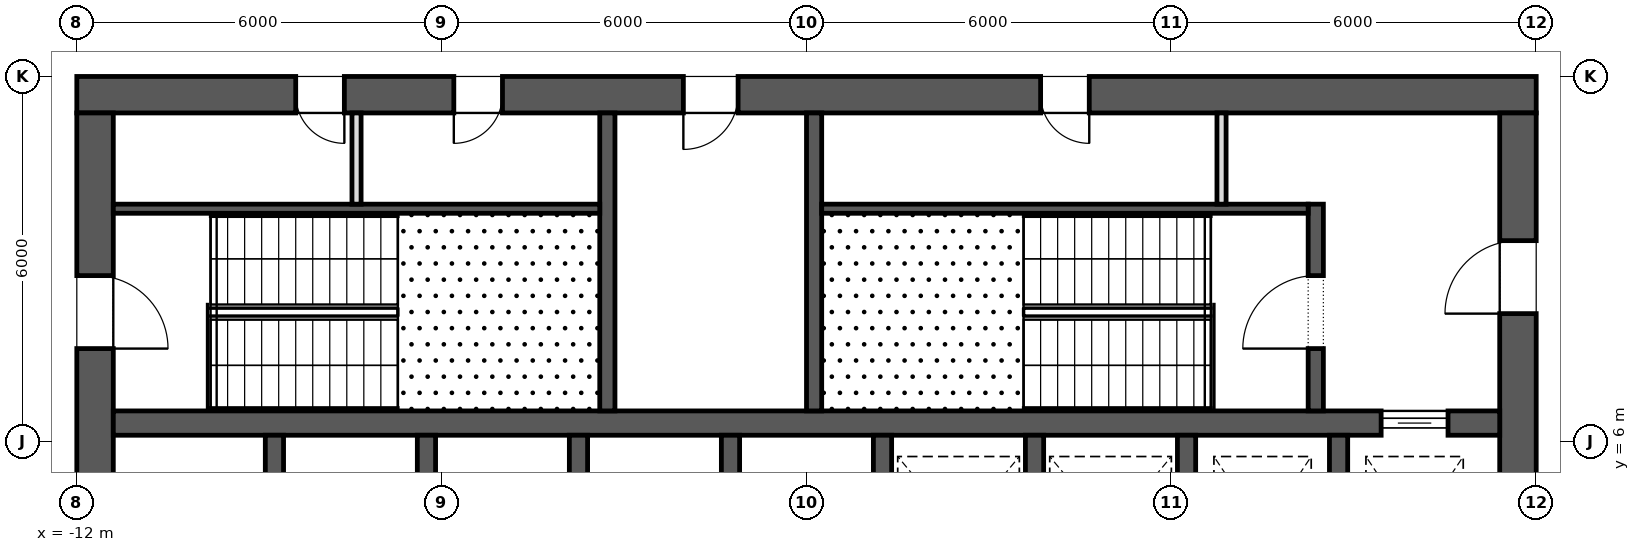
"""IFC4 building model, lengths in metres.
Left out: names, types, materials, properties, quantities, classifications, styles, units other than length and angle.
Written with IfcOpenShell. Run it as: python <this file> out.ifc"""

import sys

from ifc_helpers import new_model, si_unit, direction, frame, frame_2d, origin, place, context, subcontext, project, spatial, rectangle, extrude, element, fill, save


model = new_model("IFC4")
c1 = context("Model", 3, precision=1e-05, world=origin(), true_north=direction((0.0, 1.0)))
c2 = subcontext(c1, "Body", "Model", "MODEL_VIEW")
j1 = project(units=[si_unit("LENGTHUNIT", "METRE"), si_unit("PLANEANGLEUNIT", "RADIAN")], contexts=[c1])
p1 = place(None, origin())
s1 = spatial("IfcSite", under=j1, at=p1, CompositionType="ELEMENT")
p2 = place(p1, origin())
s2 = spatial("IfcBuilding", under=s1, at=p2, CompositionType="ELEMENT")
p3 = place(p2, frame((0.0, 0.0, 31.9)))
s3 = spatial("IfcBuildingStorey", under=s2, at=p3, CompositionType="ELEMENT", Elevation=31.9)
p4 = place(p3, frame((-12.0, 11.7, 0.0), z_axis=(0.0, 0.0, 1.0), x_axis=(1.0, 0.0, 0.0)))
e1 = element("IfcWall", 1, at=p4, inside=s3, PredefinedType="SHEAR", context=c2, shape_type="SweptSolid", body=[
    extrude(rectangle(XDim=24.0, YDim=0.6, at=frame_2d((12.0, 0.0))), origin(), (0.0, 0.0, 1.0), 4.2),
])
p5 = place(p4, frame((9.975, 0.0, 0.0)))
e2 = element("IfcOpeningElement", 2, at=p5, cuts=e1, PredefinedType="OPENING", context=c2, shape_type="SweptSolid", body=[
    extrude(rectangle(XDim=0.9, YDim=2.1, at=frame_2d((0.45, 1.05))), frame((0.0, 0.312, 0.0), z_axis=(0.0, -1.0, 0.0), x_axis=(1.0, 0.0, 0.0)), (0.0, 0.0, 1.0), 0.624),
])
p6 = place(p4, frame((3.6, 0.0, 0.0)))
e3 = element("IfcOpeningElement", 3, at=p6, cuts=e1, PredefinedType="OPENING", context=c2, shape_type="SweptSolid", body=[
    extrude(rectangle(XDim=0.8, YDim=2.1, at=frame_2d((0.4, 1.05))), frame((0.0, 0.312, 0.0), z_axis=(0.0, -1.0, 0.0), x_axis=(1.0, 0.0, 0.0)), (0.0, 0.0, 1.0), 0.624),
])
p7 = place(p4, frame((6.2, 0.0, 0.0)))
e4 = element("IfcOpeningElement", 4, at=p7, cuts=e1, PredefinedType="OPENING", context=c2, shape_type="SweptSolid", body=[
    extrude(rectangle(XDim=0.8, YDim=2.1, at=frame_2d((0.4, 1.05))), frame((0.0, 0.312, 0.0), z_axis=(0.0, -1.0, 0.0), x_axis=(1.0, 0.0, 0.0)), (0.0, 0.0, 1.0), 0.624),
])
p8 = place(p4, frame((15.85, 0.0, 0.0)))
e5 = element("IfcOpeningElement", 5, at=p8, cuts=e1, PredefinedType="OPENING", context=c2, shape_type="SweptSolid", body=[
    extrude(rectangle(XDim=0.8, YDim=2.1, at=frame_2d((0.4, 1.05))), frame((0.0, 0.312, 0.0), z_axis=(0.0, -1.0, 0.0), x_axis=(1.0, 0.0, 0.0)), (0.0, 0.0, 1.0), 0.624),
])
p9 = place(p3, frame((11.7, -11.4, 0.0), z_axis=(0.0, 0.0, 1.0), x_axis=(0.0, 1.0, 0.0)))
e6 = element("IfcWall", 6, at=p9, inside=s3, PredefinedType="SHEAR", context=c2, shape_type="SweptSolid", body=[
    extrude(rectangle(XDim=22.8, YDim=0.6, at=frame_2d((11.4, 0.0))), origin(), (0.0, 0.0, 1.0), 4.2),
])
p10 = place(p9, frame((10.2, 0.0, 0.0)))
e7 = element("IfcOpeningElement", 7, at=p10, cuts=e6, PredefinedType="OPENING", context=c2, shape_type="SweptSolid", body=[
    extrude(rectangle(XDim=2.4, YDim=2.1, at=frame_2d((1.2, 1.05))), frame((0.0, 0.312, 0.0), z_axis=(0.0, -1.0, 0.0), x_axis=(1.0, 0.0, 0.0)), (0.0, 0.0, 1.0), 0.624),
])
p11 = place(p9, frame((19.5, 0.0, 0.0)))
e8 = element("IfcOpeningElement", 8, at=p11, cuts=e6, PredefinedType="OPENING", context=c2, shape_type="SweptSolid", body=[
    extrude(rectangle(XDim=1.2, YDim=2.1, at=frame_2d((0.6, 1.05))), frame((0.0, 0.312, 0.0), z_axis=(0.0, -1.0, 0.0), x_axis=(1.0, 0.0, 0.0)), (0.0, 0.0, 1.0), 0.624),
])
p12 = place(p9, frame((2.1, 0.0, 0.0)))
e9 = element("IfcOpeningElement", 9, at=p12, cuts=e6, PredefinedType="OPENING", context=c2, shape_type="SweptSolid", body=[
    extrude(rectangle(XDim=1.2, YDim=2.1, at=frame_2d((0.6, 1.05))), frame((0.0, 0.312, 0.0), z_axis=(0.0, -1.0, 0.0), x_axis=(1.0, 0.0, 0.0)), (0.0, 0.0, 1.0), 0.624),
])
p13 = place(p3, frame((-11.7, -11.4, 0.0), z_axis=(0.0, 0.0, 1.0), x_axis=(0.0, 1.0, 0.0)))
e10 = element("IfcWall", 10, at=p13, inside=s3, PredefinedType="SHEAR", context=c2, shape_type="SweptSolid", body=[
    extrude(rectangle(XDim=22.8, YDim=0.6, at=frame_2d((11.4, 0.0))), origin(), (0.0, 0.0, 1.0), 4.2),
])
p14 = place(p13, frame((10.2, 0.0, 0.0)))
e11 = element("IfcOpeningElement", 11, at=p14, cuts=e10, PredefinedType="OPENING", context=c2, shape_type="SweptSolid", body=[
    extrude(rectangle(XDim=2.4, YDim=2.1, at=frame_2d((1.2, 1.05))), frame((0.0, 0.312, 0.0), z_axis=(0.0, -1.0, 0.0), x_axis=(1.0, 0.0, 0.0)), (0.0, 0.0, 1.0), 0.624),
])
p15 = place(p13, frame((18.925, 0.0, 0.0)))
e12 = element("IfcOpeningElement", 12, at=p15, cuts=e10, PredefinedType="OPENING", context=c2, shape_type="SweptSolid", body=[
    extrude(rectangle(XDim=1.2, YDim=2.1, at=frame_2d((0.6, 1.05))), frame((0.0, 0.312, 0.0), z_axis=(0.0, -1.0, 0.0), x_axis=(1.0, 0.0, 0.0)), (0.0, 0.0, 1.0), 0.624),
])
p16 = place(p13, frame((2.675, 0.0, 0.0)))
e13 = element("IfcOpeningElement", 13, at=p16, cuts=e10, PredefinedType="OPENING", context=c2, shape_type="SweptSolid", body=[
    extrude(rectangle(XDim=1.2, YDim=2.1, at=frame_2d((0.6, 1.05))), frame((0.0, 0.312, 0.0), z_axis=(0.0, -1.0, 0.0), x_axis=(1.0, 0.0, 0.0)), (0.0, 0.0, 1.0), 0.624),
])
p17 = place(p3, frame((-11.4, 6.3, 0.0), z_axis=(0.0, 0.0, 1.0), x_axis=(1.0, 0.0, 0.0)))
e14 = element("IfcWall", 14, at=p17, inside=s3, PredefinedType="SHEAR", context=c2, shape_type="SweptSolid", body=[
    extrude(rectangle(XDim=22.8, YDim=0.4, at=frame_2d((11.4, 0.0))), origin(), (0.0, 0.0, 1.0), 4.2),
])
p18 = place(p17, frame((20.85, 0.0, 0.0)))
e15 = element("IfcOpeningElement", 15, at=p18, cuts=e14, PredefinedType="OPENING", context=c2, shape_type="SweptSolid", body=[
    extrude(rectangle(XDim=1.1, YDim=2.1, at=frame_2d((0.55, 1.05))), frame((0.0, 0.212, 0.0), z_axis=(0.0, -1.0, 0.0), x_axis=(1.0, 0.0, 0.0)), (0.0, 0.0, 1.0), 0.424),
])
for number, where, z_axis, x_axis in (
    (16, (-8.75, 3.2, 0.0), (0.0, 0.0, 1.0), (0.0, 1.0, 0.0)),
    (17, (-6.25, 3.2, 0.0), (0.0, 0.0, 1.0), (0.0, 1.0, 0.0)),
    (18, (-3.75, 3.2, 0.0), (0.0, 0.0, 1.0), (0.0, 1.0, 0.0)),
    (19, (-1.25, 3.2, 0.0), (0.0, 0.0, 1.0), (0.0, 1.0, 0.0)),
    (20, (1.25, 3.2, 0.0), (0.0, 0.0, 1.0), (0.0, 1.0, 0.0)),
    (21, (3.75, 3.2, 0.0), (0.0, 0.0, 1.0), (0.0, 1.0, 0.0)),
    (22, (6.25, 3.2, 0.0), (0.0, 0.0, 1.0), (0.0, 1.0, 0.0)),
    (23, (8.75, 3.2, 0.0), (0.0, 0.0, 1.0), (0.0, 1.0, 0.0)),
):
    element("IfcWall", number, at=place(p3, frame(where, z_axis=z_axis, x_axis=x_axis)), inside=s3, PredefinedType="SHEAR", context=c2, shape_type="SweptSolid", body=[
        extrude(rectangle(XDim=2.9, YDim=0.3, at=frame_2d((1.45, 0.0))), origin(), (0.0, 0.0, 1.0), 4.2),
    ])
for number, where, z_axis, x_axis in (
    (24, (-3.275, 6.5, 0.0), (0.0, 0.0, 1.0), (0.0, 1.0, 0.0)),
    (25, (0.125, 6.5, 0.0), (0.0, 0.0, 1.0), (0.0, 1.0, 0.0)),
):
    element("IfcWall", number, at=place(p3, frame(where, z_axis=z_axis, x_axis=x_axis)), inside=s3, PredefinedType="SHEAR", context=c2, shape_type="SweptSolid", body=[
        extrude(rectangle(XDim=4.9, YDim=0.25, at=frame_2d((2.45, 0.0))), origin(), (0.0, 0.0, 1.0), 3.9),
    ])
p19 = place(p3, frame((8.375, 6.5, 0.0), z_axis=(0.0, 0.0, 1.0), x_axis=(0.0, 1.0, 0.0)))
e26 = element("IfcWall", 26, at=p19, inside=s3, PredefinedType="SHEAR", context=c2, shape_type="SweptSolid", body=[
    extrude(rectangle(XDim=3.4, YDim=0.25, at=frame_2d((1.7, 0.0))), origin(), (0.0, 0.0, 1.0), 3.9),
])
p20 = place(p19, frame((1.025, 0.0, 0.0)))
e27 = element("IfcOpeningElement", 27, at=p20, cuts=e26, PredefinedType="OPENING", context=c2, shape_type="SweptSolid", body=[
    extrude(rectangle(XDim=1.2, YDim=2.1, at=frame_2d((0.6, 1.05))), frame((0.0, 0.137, 0.0), z_axis=(0.0, -1.0, 0.0), x_axis=(1.0, 0.0, 0.0)), (0.0, 0.0, 1.0), 0.274),
])
for number, where, z_axis, x_axis in (
    (28, (-11.4, 9.825, 0.0), (0.0, 0.0, 1.0), (1.0, 0.0, 0.0)),
    (29, (0.25, 9.825, 0.0), (0.0, 0.0, 1.0), (1.0, 0.0, 0.0)),
):
    element("IfcWall", number, at=place(p3, frame(where, z_axis=z_axis, x_axis=x_axis)), inside=s3, PredefinedType="SHEAR", context=c2, shape_type="SweptSolid", body=[
        extrude(rectangle(XDim=8.0, YDim=0.15, at=frame_2d((4.0, 0.0))), origin(), (0.0, 0.0, 1.0), 3.9),
    ])
for number, where, z_axis, x_axis in (
    (30, (-7.4, 9.9, 0.0), (0.0, 0.0, 1.0), (0.0, 1.0, 0.0)),
    (31, (6.825, 9.9, 0.0), (0.0, 0.0, 1.0), (0.0, 1.0, 0.0)),
):
    element("IfcWall", number, at=place(p3, frame(where, z_axis=z_axis, x_axis=x_axis)), inside=s3, PredefinedType="PARTITIONING", context=c2, shape_type="SweptSolid", body=[
        extrude(rectangle(XDim=1.5, YDim=0.15, at=frame_2d((0.75, 0.0))), origin(), (0.0, 0.0, 1.0), 3.9),
    ])
p21 = place(p18, origin())
e32 = element("IfcDoor", 32, at=p21, inside=s3, OperationType="SLIDING_TO_LEFT", PredefinedType="DOOR", context=c2, shape_type="SweptSolid", body=[
    extrude(rectangle(XDim=1.1, YDim=2.1, at=frame_2d((0.55, 1.05))), frame((0.0, 0.025, 0.0), z_axis=(0.0, -1.0, 0.0), x_axis=(1.0, 0.0, 0.0)), (0.0, 0.0, 1.0), 0.05),
])
fill(e15, e32)
p22 = place(p15, frame((1.2, 0.0, 0.0), z_axis=(0.0, 0.0, 1.0), x_axis=(-1.0, 0.0, 0.0)))
e33 = element("IfcDoor", 33, at=p22, inside=s3, OperationType="SINGLE_SWING_LEFT", PredefinedType="DOOR", context=c2, shape_type="SweptSolid", body=[
    extrude(rectangle(XDim=1.2, YDim=2.1, at=frame_2d((0.6, 1.05))), frame((0.0, 0.025, 0.0), z_axis=(0.0, -1.0, 0.0), x_axis=(1.0, 0.0, 0.0)), (0.0, 0.0, 1.0), 0.05),
])
fill(e12, e33)
p23 = place(p20, origin())
e34 = element("IfcDoor", 34, at=p23, inside=s3, OperationType="SINGLE_SWING_RIGHT", PredefinedType="DOOR", context=c2, shape_type="SweptSolid", body=[
    extrude(rectangle(XDim=1.2, YDim=2.1, at=frame_2d((0.6, 1.05))), frame((0.0, 0.025, 0.0), z_axis=(0.0, -1.0, 0.0), x_axis=(1.0, 0.0, 0.0)), (0.0, 0.0, 1.0), 0.05),
])
fill(e27, e34)
p24 = place(p11, origin())
e35 = element("IfcDoor", 35, at=p24, inside=s3, OperationType="SINGLE_SWING_RIGHT", PredefinedType="DOOR", context=c2, shape_type="SweptSolid", body=[
    extrude(rectangle(XDim=1.2, YDim=2.1, at=frame_2d((0.6, 1.05))), frame((0.0, 0.025, 0.0), z_axis=(0.0, -1.0, 0.0), x_axis=(1.0, 0.0, 0.0)), (0.0, 0.0, 1.0), 0.05),
])
fill(e8, e35)
p25 = place(p5, frame((0.9, 0.0, 0.0), z_axis=(0.0, 0.0, 1.0), x_axis=(-1.0, 0.0, 0.0)))
e36 = element("IfcDoor", 36, at=p25, inside=s3, OperationType="SINGLE_SWING_LEFT", PredefinedType="DOOR", context=c2, shape_type="SweptSolid", body=[
    extrude(rectangle(XDim=0.9, YDim=2.1, at=frame_2d((0.45, 1.05))), frame((0.0, 0.025, 0.0), z_axis=(0.0, -1.0, 0.0), x_axis=(1.0, 0.0, 0.0)), (0.0, 0.0, 1.0), 0.05),
])
fill(e2, e36)
p26 = place(p6, frame((0.8, 0.0, 0.0), z_axis=(0.0, 0.0, 1.0), x_axis=(-1.0, 0.0, 0.0)))
e37 = element("IfcDoor", 37, at=p26, inside=s3, OperationType="SINGLE_SWING_RIGHT", PredefinedType="DOOR", context=c2, shape_type="SweptSolid", body=[
    extrude(rectangle(XDim=0.8, YDim=2.1, at=frame_2d((0.4, 1.05))), frame((0.0, 0.025, 0.0), z_axis=(0.0, -1.0, 0.0), x_axis=(1.0, 0.0, 0.0)), (0.0, 0.0, 1.0), 0.05),
])
fill(e3, e37)
p27 = place(p7, frame((0.8, 0.0, 0.0), z_axis=(0.0, 0.0, 1.0), x_axis=(-1.0, 0.0, 0.0)))
e38 = element("IfcDoor", 38, at=p27, inside=s3, OperationType="SINGLE_SWING_LEFT", PredefinedType="DOOR", context=c2, shape_type="SweptSolid", body=[
    extrude(rectangle(XDim=0.8, YDim=2.1, at=frame_2d((0.4, 1.05))), frame((0.0, 0.025, 0.0), z_axis=(0.0, -1.0, 0.0), x_axis=(1.0, 0.0, 0.0)), (0.0, 0.0, 1.0), 0.05),
])
fill(e4, e38)
p28 = place(p8, frame((0.8, 0.0, 0.0), z_axis=(0.0, 0.0, 1.0), x_axis=(-1.0, 0.0, 0.0)))
e39 = element("IfcDoor", 39, at=p28, inside=s3, OperationType="SINGLE_SWING_RIGHT", PredefinedType="DOOR", context=c2, shape_type="SweptSolid", body=[
    extrude(rectangle(XDim=0.8, YDim=2.1, at=frame_2d((0.4, 1.05))), frame((0.0, 0.025, 0.0), z_axis=(0.0, -1.0, 0.0), x_axis=(1.0, 0.0, 0.0)), (0.0, 0.0, 1.0), 0.05),
])
fill(e5, e39)
save(model, sys.argv[1])
